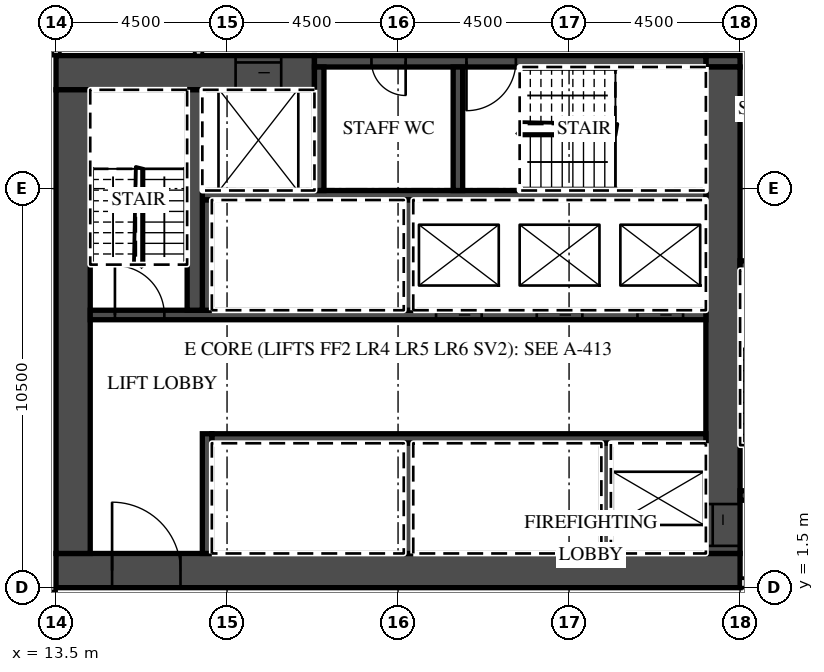
"""IFC4 building model, lengths in metres.
Left out: names, types, materials, properties, quantities, classifications, styles, units other than length and angle.
Written with IfcOpenShell. Run it as: python <this file> out.ifc"""

import sys

from ifc_helpers import new_model, si_unit, direction, frame, frame_2d, origin, place, context, subcontext, project, spatial, rectangle, extrude, element, fill, save


model = new_model("IFC4")
c1 = context("Model", 3, precision=1e-05, world=origin(), true_north=direction((0.0, 1.0)))
c2 = subcontext(c1, "Body", "Model", "MODEL_VIEW")
j1 = project(units=[si_unit("LENGTHUNIT", "METRE"), si_unit("PLANEANGLEUNIT", "RADIAN")], contexts=[c1])
p1 = place(None, origin())
s1 = spatial("IfcSite", under=j1, at=p1, CompositionType="ELEMENT")
p2 = place(p1, origin())
s2 = spatial("IfcBuilding", under=s1, at=p2, CompositionType="ELEMENT")
p3 = place(p2, frame((0.0, 0.0, 69.9)))
s3 = spatial("IfcBuildingStorey", under=s2, at=p3, CompositionType="ELEMENT", Elevation=69.9)
p4 = place(p3, frame((13.5, 15.5, 0.0), z_axis=(0.0, 0.0, 1.0), x_axis=(0.0, 1.0, 0.0)))
e1 = element("IfcWall", 1, at=p4, inside=s3, PredefinedType="PARTITIONING", context=c2, shape_type="SweptSolid", body=[
    extrude(rectangle(XDim=6.05, YDim=0.2, at=frame_2d((3.025, 0.0))), origin(), (0.0, 0.0, 1.0), 3.02),
])
p5 = place(p3, frame((-44.55, 1.3, 0.0), z_axis=(0.0, 0.0, 1.0), x_axis=(1.0, 0.0, 0.0)))
e2 = element("IfcWall", 2, at=p5, inside=s3, PredefinedType="PARTITIONING", context=c2, shape_type="SweptSolid", body=[
    extrude(rectangle(XDim=58.05, YDim=0.2, at=frame_2d((29.025, 0.0))), origin(), (0.0, 0.0, 1.0), 3.02),
])
p6 = place(p5, frame((0.525, 0.0, 0.0)))
e3 = element("IfcOpeningElement", 3, at=p6, cuts=e2, PredefinedType="OPENING", context=c2, shape_type="SweptSolid", body=[
    extrude(rectangle(XDim=1.0, YDim=2.1, at=frame_2d((0.5, 1.05))), frame((0.0, 0.11, 0.0), z_axis=(0.0, -1.0, 0.0), x_axis=(1.0, 0.0, 0.0)), (0.0, 0.0, 1.0), 0.22),
])
p7 = place(p5, frame((6.975, 0.0, 0.0)))
e4 = element("IfcOpeningElement", 4, at=p7, cuts=e2, PredefinedType="OPENING", context=c2, shape_type="SweptSolid", body=[
    extrude(rectangle(XDim=1.0, YDim=2.1, at=frame_2d((0.5, 1.05))), frame((0.0, 0.11, 0.0), z_axis=(0.0, -1.0, 0.0), x_axis=(1.0, 0.0, 0.0)), (0.0, 0.0, 1.0), 0.22),
])
p8 = place(p5, frame((9.125, 0.0, 0.0)))
e5 = element("IfcOpeningElement", 5, at=p8, cuts=e2, PredefinedType="OPENING", context=c2, shape_type="SweptSolid", body=[
    extrude(rectangle(XDim=1.0, YDim=2.1, at=frame_2d((0.5, 1.05))), frame((0.0, 0.11, 0.0), z_axis=(0.0, -1.0, 0.0), x_axis=(1.0, 0.0, 0.0)), (0.0, 0.0, 1.0), 0.22),
])
p9 = place(p5, frame((13.6, 0.0, 0.0)))
e6 = element("IfcOpeningElement", 6, at=p9, cuts=e2, PredefinedType="OPENING", context=c2, shape_type="SweptSolid", body=[
    extrude(rectangle(XDim=1.0, YDim=2.1, at=frame_2d((0.5, 1.05))), frame((0.0, 0.11, 0.0), z_axis=(0.0, -1.0, 0.0), x_axis=(1.0, 0.0, 0.0)), (0.0, 0.0, 1.0), 0.22),
])
p10 = place(p5, frame((19.987, 0.0, 0.0)))
e7 = element("IfcOpeningElement", 7, at=p10, cuts=e2, PredefinedType="OPENING", context=c2, shape_type="SweptSolid", body=[
    extrude(rectangle(XDim=1.2, YDim=2.1, at=frame_2d((0.6, 1.05))), frame((0.0, 0.11, 0.0), z_axis=(0.0, -1.0, 0.0), x_axis=(1.0, 0.0, 0.0)), (0.0, 0.0, 1.0), 0.22),
])
p11 = place(p5, frame((31.912, 0.0, 0.0)))
e8 = element("IfcOpeningElement", 8, at=p11, cuts=e2, PredefinedType="OPENING", context=c2, shape_type="SweptSolid", body=[
    extrude(rectangle(XDim=1.2, YDim=2.1, at=frame_2d((0.6, 1.05))), frame((0.0, 0.11, 0.0), z_axis=(0.0, -1.0, 0.0), x_axis=(1.0, 0.0, 0.0)), (0.0, 0.0, 1.0), 0.22),
])
p12 = place(p5, frame((38.5, 0.0, 0.0)))
e9 = element("IfcOpeningElement", 9, at=p12, cuts=e2, PredefinedType="OPENING", context=c2, shape_type="SweptSolid", body=[
    extrude(rectangle(XDim=1.0, YDim=2.1, at=frame_2d((0.5, 1.05))), frame((0.0, 0.11, 0.0), z_axis=(0.0, -1.0, 0.0), x_axis=(1.0, 0.0, 0.0)), (0.0, 0.0, 1.0), 0.22),
])
p13 = place(p5, frame((40.6, 0.0, 0.0)))
e10 = element("IfcOpeningElement", 10, at=p13, cuts=e2, PredefinedType="OPENING", context=c2, shape_type="SweptSolid", body=[
    extrude(rectangle(XDim=1.0, YDim=2.1, at=frame_2d((0.5, 1.05))), frame((0.0, 0.11, 0.0), z_axis=(0.0, -1.0, 0.0), x_axis=(1.0, 0.0, 0.0)), (0.0, 0.0, 1.0), 0.22),
])
p14 = place(p5, frame((47.5, 0.0, 0.0)))
e11 = element("IfcOpeningElement", 11, at=p14, cuts=e2, PredefinedType="OPENING", context=c2, shape_type="SweptSolid", body=[
    extrude(rectangle(XDim=1.0, YDim=2.1, at=frame_2d((0.5, 1.05))), frame((0.0, 0.11, 0.0), z_axis=(0.0, -1.0, 0.0), x_axis=(1.0, 0.0, 0.0)), (0.0, 0.0, 1.0), 0.22),
])
p15 = place(p5, frame((51.975, 0.0, 0.0)))
e12 = element("IfcOpeningElement", 12, at=p15, cuts=e2, PredefinedType="OPENING", context=c2, shape_type="SweptSolid", body=[
    extrude(rectangle(XDim=1.0, YDim=2.1, at=frame_2d((0.5, 1.05))), frame((0.0, 0.11, 0.0), z_axis=(0.0, -1.0, 0.0), x_axis=(1.0, 0.0, 0.0)), (0.0, 0.0, 1.0), 0.22),
])
p16 = place(p5, frame((56.475, 0.0, 0.0)))
e13 = element("IfcOpeningElement", 13, at=p16, cuts=e2, PredefinedType="OPENING", context=c2, shape_type="SweptSolid", body=[
    extrude(rectangle(XDim=1.0, YDim=2.1, at=frame_2d((0.5, 1.05))), frame((0.0, 0.11, 0.0), z_axis=(0.0, -1.0, 0.0), x_axis=(1.0, 0.0, 0.0)), (0.0, 0.0, 1.0), 0.22),
])
p17 = place(p3, frame((13.5, 1.95, 0.0), z_axis=(0.0, 0.0, 1.0), x_axis=(1.0, 0.0, 0.0)))
e14 = element("IfcWall", 14, at=p17, inside=s3, PredefinedType="SHEAR", context=c2, shape_type="SweptSolid", body=[
    extrude(rectangle(XDim=18.0, YDim=0.9, at=frame_2d((9.0, 0.0))), origin(), (0.0, 0.0, 1.0), 3.02),
])
p18 = place(p17, frame((1.475, 0.0, 0.0)))
e15 = element("IfcOpeningElement", 15, at=p18, cuts=e14, PredefinedType="OPENING", context=c2, shape_type="SweptSolid", body=[
    extrude(rectangle(XDim=1.8, YDim=2.1, at=frame_2d((0.9, 1.05))), frame((0.0, 0.46, 0.0), z_axis=(0.0, -1.0, 0.0), x_axis=(1.0, 0.0, 0.0)), (0.0, 0.0, 1.0), 0.92),
])
p19 = place(p3, frame((13.5, 15.05, 0.0), z_axis=(0.0, 0.0, 1.0), x_axis=(1.0, 0.0, 0.0)))
e16 = element("IfcWall", 16, at=p19, inside=s3, PredefinedType="SHEAR", context=c2, shape_type="SweptSolid", body=[
    extrude(rectangle(XDim=6.8, YDim=0.9, at=frame_2d((3.4, 0.0))), origin(), (0.0, 0.0, 1.0), 3.02),
])
p20 = place(p19, frame((4.725, 0.0, 0.0)))
e17 = element("IfcOpeningElement", 17, at=p20, cuts=e16, PredefinedType="OPENING", context=c2, shape_type="SweptSolid", body=[
    extrude(rectangle(XDim=1.2, YDim=2.1, at=frame_2d((0.6, 1.05))), frame((0.0, 0.46, 0.0), z_axis=(0.0, -1.0, 0.0), x_axis=(1.0, 0.0, 0.0)), (0.0, 0.0, 1.0), 0.92),
])
p21 = place(p3, frame((30.6, 15.35, 0.0), z_axis=(0.0, 0.0, 1.0), x_axis=(1.0, 0.0, 0.0)))
e18 = element("IfcWall", 18, at=p21, inside=s3, PredefinedType="SHEAR", context=c2, shape_type="SweptSolid", body=[
    extrude(rectangle(XDim=0.9, YDim=0.3, at=frame_2d((0.45, 0.0))), origin(), (0.0, 0.0, 1.0), 3.02),
])
p22 = place(p3, frame((20.3, 15.35, 0.0), z_axis=(0.0, 0.0, 1.0), x_axis=(1.0, 0.0, 0.0)))
e19 = element("IfcWall", 19, at=p22, inside=s3, PredefinedType="SHEAR", context=c2, shape_type="SweptSolid", body=[
    extrude(rectangle(XDim=10.3, YDim=0.3, at=frame_2d((5.15, 0.0))), origin(), (0.0, 0.0, 1.0), 3.02),
])
p23 = place(p22, frame((4.0, 0.0, 0.0)))
e20 = element("IfcOpeningElement", 20, at=p23, cuts=e19, PredefinedType="OPENING", context=c2, shape_type="SweptSolid", body=[
    extrude(rectangle(XDim=1.3, YDim=2.1, at=frame_2d((0.65, 1.05))), frame((0.0, 0.16, 0.0), z_axis=(0.0, -1.0, 0.0), x_axis=(1.0, 0.0, 0.0)), (0.0, 0.0, 1.0), 0.32),
])
p24 = place(p22, frame((1.5, 0.0, 0.0)))
e21 = element("IfcOpeningElement", 21, at=p24, cuts=e19, PredefinedType="OPENING", context=c2, shape_type="SweptSolid", body=[
    extrude(rectangle(XDim=0.9, YDim=2.1, at=frame_2d((0.45, 1.05))), frame((0.0, 0.16, 0.0), z_axis=(0.0, -1.0, 0.0), x_axis=(1.0, 0.0, 0.0)), (0.0, 0.0, 1.0), 0.32),
])
p25 = place(p3, frame((31.05, 2.4, 0.0), z_axis=(0.0, 0.0, 1.0), x_axis=(0.0, 1.0, 0.0)))
e22 = element("IfcWall", 22, at=p25, inside=s3, PredefinedType="SHEAR", context=c2, shape_type="SweptSolid", body=[
    extrude(rectangle(XDim=12.8, YDim=0.9, at=frame_2d((6.4, 0.0))), origin(), (0.0, 0.0, 1.0), 3.02),
])
p26 = place(p25, frame((0.2, 0.0, 0.0)))
e23 = element("IfcOpeningElement", 23, at=p26, cuts=e22, PredefinedType="OPENING", context=c2, shape_type="SweptSolid", body=[
    extrude(rectangle(XDim=1.1, YDim=2.1, at=frame_2d((0.55, 1.05))), frame((0.0, 0.46, 0.0), z_axis=(0.0, -1.0, 0.0), x_axis=(1.0, 0.0, 0.0)), (0.0, 0.0, 1.0), 0.92),
])
p27 = place(p3, frame((13.95, 2.4, 0.0), z_axis=(0.0, 0.0, 1.0), x_axis=(0.0, 1.0, 0.0)))
e24 = element("IfcWall", 24, at=p27, inside=s3, PredefinedType="SHEAR", context=c2, shape_type="SweptSolid", body=[
    extrude(rectangle(XDim=12.2, YDim=0.9, at=frame_2d((6.1, 0.0))), origin(), (0.0, 0.0, 1.0), 3.02),
])
p28 = place(p3, frame((17.6, 5.425, 0.0), z_axis=(0.0, 0.0, 1.0), x_axis=(1.0, 0.0, 0.0)))
e25 = element("IfcWall", 25, at=p28, inside=s3, PredefinedType="SHEAR", context=c2, shape_type="SweptSolid", body=[
    extrude(rectangle(XDim=13.0, YDim=0.25, at=frame_2d((6.5, 0.0))), origin(), (0.0, 0.0, 1.0), 3.02),
])
p29 = place(p3, frame((17.475, 2.4, 0.0), z_axis=(0.0, 0.0, 1.0), x_axis=(0.0, 1.0, 0.0)))
e26 = element("IfcWall", 26, at=p29, inside=s3, PredefinedType="SHEAR", context=c2, shape_type="SweptSolid", body=[
    extrude(rectangle(XDim=3.15, YDim=0.25, at=frame_2d((1.575, 0.0))), origin(), (0.0, 0.0, 1.0), 3.02),
])
for number, where, z_axis, x_axis in (
    (27, (27.975, 2.4, 0.0), (0.0, 0.0, 1.0), (0.0, 1.0, 0.0)),
    (28, (22.775, 2.4, 0.0), (0.0, 0.0, 1.0), (0.0, 1.0, 0.0)),
):
    element("IfcWall", number, at=place(p3, frame(where, z_axis=z_axis, x_axis=x_axis)), inside=s3, PredefinedType="SHEAR", context=c2, shape_type="SweptSolid", body=[
        extrude(rectangle(XDim=2.9, YDim=0.25, at=frame_2d((1.45, 0.0))), origin(), (0.0, 0.0, 1.0), 3.02),
    ])
p30 = place(p3, frame((14.4, 8.675, 0.0), z_axis=(0.0, 0.0, 1.0), x_axis=(1.0, 0.0, 0.0)))
e29 = element("IfcWall", 29, at=p30, inside=s3, PredefinedType="SHEAR", context=c2, shape_type="SweptSolid", body=[
    extrude(rectangle(XDim=16.2, YDim=0.25, at=frame_2d((8.1, 0.0))), origin(), (0.0, 0.0, 1.0), 3.02),
])
p31 = place(p30, frame((14.4, 0.0, 0.0)))
e30 = element("IfcOpeningElement", 30, at=p31, cuts=e29, PredefinedType="OPENING", context=c2, shape_type="SweptSolid", body=[
    extrude(rectangle(XDim=1.2, YDim=2.1, at=frame_2d((0.6, 1.05))), frame((0.0, 0.135, 0.0), z_axis=(0.0, -1.0, 0.0), x_axis=(1.0, 0.0, 0.0)), (0.0, 0.0, 1.0), 0.27),
])
p32 = place(p30, frame((11.75, 0.0, 0.0)))
e31 = element("IfcOpeningElement", 31, at=p32, cuts=e29, PredefinedType="OPENING", context=c2, shape_type="SweptSolid", body=[
    extrude(rectangle(XDim=1.2, YDim=2.1, at=frame_2d((0.6, 1.05))), frame((0.0, 0.135, 0.0), z_axis=(0.0, -1.0, 0.0), x_axis=(1.0, 0.0, 0.0)), (0.0, 0.0, 1.0), 0.27),
])
p33 = place(p30, frame((9.1, 0.0, 0.0)))
e32 = element("IfcOpeningElement", 32, at=p33, cuts=e29, PredefinedType="OPENING", context=c2, shape_type="SweptSolid", body=[
    extrude(rectangle(XDim=1.2, YDim=2.1, at=frame_2d((0.6, 1.05))), frame((0.0, 0.135, 0.0), z_axis=(0.0, -1.0, 0.0), x_axis=(1.0, 0.0, 0.0)), (0.0, 0.0, 1.0), 0.27),
])
p34 = place(p30, frame((0.65, 0.0, 0.0)))
e33 = element("IfcOpeningElement", 33, at=p34, cuts=e29, PredefinedType="OPENING", context=c2, shape_type="SweptSolid", body=[
    extrude(rectangle(XDim=1.3, YDim=2.1, at=frame_2d((0.65, 1.05))), frame((0.0, 0.135, 0.0), z_axis=(0.0, -1.0, 0.0), x_axis=(1.0, 0.0, 0.0)), (0.0, 0.0, 1.0), 0.27),
])
p35 = place(p3, frame((17.35, 11.825, 0.0), z_axis=(0.0, 0.0, 1.0), x_axis=(1.0, 0.0, 0.0)))
e34 = element("IfcWall", 34, at=p35, inside=s3, PredefinedType="SHEAR", context=c2, shape_type="SweptSolid", body=[
    extrude(rectangle(XDim=13.25, YDim=0.25, at=frame_2d((6.625, 0.0))), origin(), (0.0, 0.0, 1.0), 3.02),
])
for number, where, z_axis, x_axis in (
    (35, (17.475, 8.8, 0.0), (0.0, 0.0, 1.0), (0.0, 1.0, 0.0)),
    (36, (22.775, 8.8, 0.0), (0.0, 0.0, 1.0), (0.0, 1.0, 0.0)),
):
    element("IfcWall", number, at=place(p3, frame(where, z_axis=z_axis, x_axis=x_axis)), inside=s3, PredefinedType="SHEAR", context=c2, shape_type="SweptSolid", body=[
        extrude(rectangle(XDim=2.9, YDim=0.25, at=frame_2d((1.45, 0.0))), origin(), (0.0, 0.0, 1.0), 3.02),
    ])
p36 = place(p3, frame((17.15, 8.8, 0.0), z_axis=(0.0, 0.0, 1.0), x_axis=(0.0, 1.0, 0.0)))
e37 = element("IfcWall", 37, at=p36, inside=s3, PredefinedType="SHEAR", context=c2, shape_type="SweptSolid", body=[
    extrude(rectangle(XDim=5.8, YDim=0.4, at=frame_2d((2.9, 0.0))), origin(), (0.0, 0.0, 1.0), 3.02),
])
for number, where, z_axis, x_axis in (
    (38, (20.425, 11.95, 0.0), (0.0, 0.0, 1.0), (0.0, 1.0, 0.0)),
    (39, (24.075, 11.95, 0.0), (0.0, 0.0, 1.0), (0.0, 1.0, 0.0)),
):
    element("IfcWall", number, at=place(p3, frame(where, z_axis=z_axis, x_axis=x_axis)), inside=s3, PredefinedType="SHEAR", context=c2, shape_type="SweptSolid", body=[
        extrude(rectangle(XDim=3.25, YDim=0.25, at=frame_2d((1.625, 0.0))), origin(), (0.0, 0.0, 1.0), 3.02),
    ])
p37 = place(p3, frame((31.5, 1.625, 0.0), z_axis=(0.0, 0.0, 1.0), x_axis=(1.0, 0.0, 0.0)))
e40 = element("IfcWall", 40, at=p37, inside=s3, PredefinedType="PARTITIONING", context=c2, shape_type="SweptSolid", body=[
    extrude(rectangle(XDim=13.05, YDim=0.25, at=frame_2d((6.525, 0.0))), origin(), (0.0, 0.0, 1.0), 3.02),
])
p38 = place(p37, frame((0.625, 0.0, 0.0)))
e41 = element("IfcOpeningElement", 41, at=p38, cuts=e40, PredefinedType="OPENING", context=c2, shape_type="SweptSolid", body=[
    extrude(rectangle(XDim=1.3, YDim=2.1, at=frame_2d((0.65, 1.05))), frame((0.0, 0.135, 0.0), z_axis=(0.0, -1.0, 0.0), x_axis=(1.0, 0.0, 0.0)), (0.0, 0.0, 1.0), 0.27),
])
p39 = place(p37, frame((3.25, 0.0, 0.0)))
e42 = element("IfcOpeningElement", 42, at=p39, cuts=e40, PredefinedType="OPENING", context=c2, shape_type="SweptSolid", body=[
    extrude(rectangle(XDim=1.1, YDim=2.1, at=frame_2d((0.55, 1.05))), frame((0.0, 0.135, 0.0), z_axis=(0.0, -1.0, 0.0), x_axis=(1.0, 0.0, 0.0)), (0.0, 0.0, 1.0), 0.27),
])
p40 = place(p3, frame((31.5, 3.925, 0.0), z_axis=(0.0, 0.0, 1.0), x_axis=(1.0, 0.0, 0.0)))
e43 = element("IfcWall", 43, at=p40, inside=s3, PredefinedType="SHEAR", context=c2, shape_type="SweptSolid", body=[
    extrude(rectangle(XDim=2.55, YDim=0.25, at=frame_2d((1.275, 0.0))), origin(), (0.0, 0.0, 1.0), 3.02),
])
p41 = place(p40, frame((0.625, 0.0, 0.0)))
e44 = element("IfcOpeningElement", 44, at=p41, cuts=e43, PredefinedType="OPENING", context=c2, shape_type="SweptSolid", body=[
    extrude(rectangle(XDim=1.3, YDim=2.1, at=frame_2d((0.65, 1.05))), frame((0.0, 0.135, 0.0), z_axis=(0.0, -1.0, 0.0), x_axis=(1.0, 0.0, 0.0)), (0.0, 0.0, 1.0), 0.27),
])
p42 = place(p3, frame((31.5, 9.975, 0.0), z_axis=(0.0, 0.0, 1.0), x_axis=(1.0, 0.0, 0.0)))
e45 = element("IfcWall", 45, at=p42, inside=s3, PredefinedType="SHEAR", context=c2, shape_type="SweptSolid", body=[
    extrude(rectangle(XDim=2.55, YDim=0.25, at=frame_2d((1.275, 0.0))), origin(), (0.0, 0.0, 1.0), 3.02),
])
p43 = place(p3, frame((17.25, 15.5, 0.0), z_axis=(0.0, 0.0, 1.0), x_axis=(0.0, 1.0, 0.0)))
e46 = element("IfcWall", 46, at=p43, inside=s3, PredefinedType="PARTITIONING", context=c2, shape_type="SweptSolid", body=[
    extrude(rectangle(XDim=2.2, YDim=0.2, at=frame_2d((1.1, 0.0))), origin(), (0.0, 0.0, 1.0), 3.02),
])
p44 = place(p31, origin())
e47 = element("IfcDoor", 47, at=p44, inside=s3, OperationType="SLIDING_TO_LEFT", PredefinedType="DOOR", context=c2, shape_type="SweptSolid", body=[
    extrude(rectangle(XDim=1.2, YDim=2.1, at=frame_2d((0.6, 1.05))), frame((0.0, 0.025, 0.0), z_axis=(0.0, -1.0, 0.0), x_axis=(1.0, 0.0, 0.0)), (0.0, 0.0, 1.0), 0.05),
])
fill(e30, e47)
p45 = place(p32, origin())
e48 = element("IfcDoor", 48, at=p45, inside=s3, OperationType="SLIDING_TO_RIGHT", PredefinedType="DOOR", context=c2, shape_type="SweptSolid", body=[
    extrude(rectangle(XDim=1.2, YDim=2.1, at=frame_2d((0.6, 1.05))), frame((0.0, 0.025, 0.0), z_axis=(0.0, -1.0, 0.0), x_axis=(1.0, 0.0, 0.0)), (0.0, 0.0, 1.0), 0.05),
])
fill(e31, e48)
p46 = place(p33, origin())
e49 = element("IfcDoor", 49, at=p46, inside=s3, OperationType="SLIDING_TO_RIGHT", PredefinedType="DOOR", context=c2, shape_type="SweptSolid", body=[
    extrude(rectangle(XDim=1.2, YDim=2.1, at=frame_2d((0.6, 1.05))), frame((0.0, 0.025, 0.0), z_axis=(0.0, -1.0, 0.0), x_axis=(1.0, 0.0, 0.0)), (0.0, 0.0, 1.0), 0.05),
])
fill(e32, e49)
p47 = place(p20, origin())
e50 = element("IfcDoor", 50, at=p47, inside=s3, OperationType="SLIDING_TO_LEFT", PredefinedType="DOOR", context=c2, shape_type="SweptSolid", body=[
    extrude(rectangle(XDim=1.2, YDim=2.1, at=frame_2d((0.6, 1.05))), frame((0.0, 0.025, 0.0), z_axis=(0.0, -1.0, 0.0), x_axis=(1.0, 0.0, 0.0)), (0.0, 0.0, 1.0), 0.05),
])
fill(e17, e50)
p48 = place(p26, origin())
e51 = element("IfcDoor", 51, at=p48, inside=s3, OperationType="SLIDING_TO_LEFT", PredefinedType="DOOR", context=c2, shape_type="SweptSolid", body=[
    extrude(rectangle(XDim=1.1, YDim=2.1, at=frame_2d((0.55, 1.05))), frame((0.0, 0.025, 0.0), z_axis=(0.0, -1.0, 0.0), x_axis=(1.0, 0.0, 0.0)), (0.0, 0.0, 1.0), 0.05),
])
fill(e23, e51)
p49 = place(p18, origin())
e52 = element("IfcDoor", 52, at=p49, inside=s3, OperationType="DOUBLE_DOOR_DOUBLE_SWING", PredefinedType="DOOR", context=c2, shape_type="SweptSolid", body=[
    extrude(rectangle(XDim=1.8, YDim=2.1, at=frame_2d((0.9, 1.05))), frame((0.0, 0.025, 0.0), z_axis=(0.0, -1.0, 0.0), x_axis=(1.0, 0.0, 0.0)), (0.0, 0.0, 1.0), 0.05),
])
fill(e15, e52)
p50 = place(p34, origin())
e53 = element("IfcDoor", 53, at=p50, inside=s3, OperationType="SINGLE_SWING_LEFT", PredefinedType="DOOR", context=c2, shape_type="SweptSolid", body=[
    extrude(rectangle(XDim=1.3, YDim=2.1, at=frame_2d((0.65, 1.05))), frame((0.0, 0.025, 0.0), z_axis=(0.0, -1.0, 0.0), x_axis=(1.0, 0.0, 0.0)), (0.0, 0.0, 1.0), 0.05),
])
fill(e33, e53)
p51 = place(p23, origin())
e54 = element("IfcDoor", 54, at=p51, inside=s3, OperationType="SINGLE_SWING_LEFT", PredefinedType="DOOR", context=c2, shape_type="SweptSolid", body=[
    extrude(rectangle(XDim=1.3, YDim=2.1, at=frame_2d((0.65, 1.05))), frame((0.0, 0.025, 0.0), z_axis=(0.0, -1.0, 0.0), x_axis=(1.0, 0.0, 0.0)), (0.0, 0.0, 1.0), 0.05),
])
fill(e20, e54)
p52 = place(p24, origin())
e55 = element("IfcDoor", 55, at=p52, inside=s3, OperationType="SINGLE_SWING_RIGHT", PredefinedType="DOOR", context=c2, shape_type="SweptSolid", body=[
    extrude(rectangle(XDim=0.9, YDim=2.1, at=frame_2d((0.45, 1.05))), frame((0.0, 0.025, 0.0), z_axis=(0.0, -1.0, 0.0), x_axis=(1.0, 0.0, 0.0)), (0.0, 0.0, 1.0), 0.05),
])
fill(e21, e55)
save(model, sys.argv[1])
